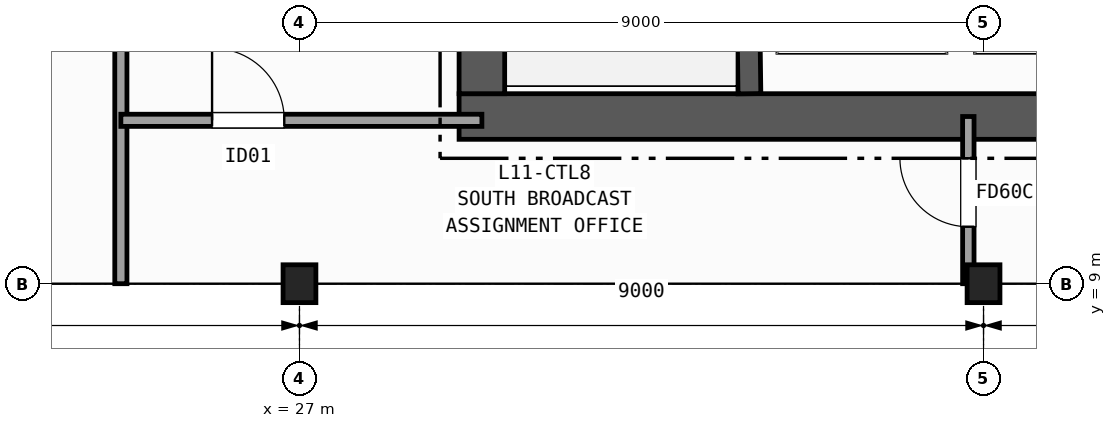
"""IFC4 building model, lengths in metres.
Left out: names, types, materials, properties, quantities, classifications, styles, units other than length and angle.
Written with IfcOpenShell. Run it as: python <this file> out.ifc"""

import sys

from ifc_helpers import new_model, si_unit, direction, frame, frame_2d, origin, origin_2d, place, context, subcontext, project, spatial, rectangle, i_section, extrude, element, fill, save


model = new_model("IFC4")
c1 = context("Model", 3, precision=1e-05, world=origin(), true_north=direction((0.0, 1.0)))
c2 = subcontext(c1, "Body", "Model", "MODEL_VIEW")
j1 = project(units=[si_unit("LENGTHUNIT", "METRE"), si_unit("PLANEANGLEUNIT", "RADIAN")], contexts=[c1])
p1 = place(None, origin())
s1 = spatial("IfcSite", under=j1, at=p1, CompositionType="ELEMENT")
p2 = place(p1, origin())
s2 = spatial("IfcBuilding", under=s1, at=p2, CompositionType="ELEMENT")
p3 = place(p2, frame((0.0, 0.0, 50.8)))
s3 = spatial("IfcBuildingStorey", under=s2, at=p3, CompositionType="ELEMENT", Elevation=50.8)
for number, where, z_axis, x_axis in (
    (1, (27.0, 9.0, 0.0), (0.0, 0.0, 1.0), (1.0, 0.0, 0.0)),
    (2, (36.0, 9.0, 0.0), (0.0, 0.0, 1.0), (1.0, 0.0, 0.0)),
):
    element("IfcColumn", number, at=place(p3, frame(where, z_axis=z_axis, x_axis=x_axis)), inside=s3, PredefinedType="COLUMN", context=c2, shape_type="SweptSolid", body=[
        extrude(i_section(OverallWidth=0.432, OverallDepth=0.498, WebThickness=0.056, FlangeThickness=0.089, FilletRadius=0.015, at=origin_2d()), origin(), (0.0, 0.0, 1.0), 3.7),
    ])
p4 = place(p3, frame((29.1, 11.2, 0.0), z_axis=(0.0, 0.0, 1.0), x_axis=(1.0, 0.0, 0.0)))
e3 = element("IfcWall", 3, at=p4, inside=s3, PredefinedType="SHEAR", context=c2, shape_type="SweptSolid", body=[
    extrude(rectangle(XDim=14.0, YDim=0.6, at=frame_2d((7.0, 0.0))), origin(), (0.0, 0.0, 1.0), 3.42),
])
p5 = place(p3, frame((29.4, 24.3, 0.0), z_axis=(0.0, 0.0, 1.0), x_axis=(0.0, -1.0, 0.0)))
e4 = element("IfcWall", 4, at=p5, inside=s3, PredefinedType="SHEAR", context=c2, shape_type="SweptSolid", body=[
    extrude(rectangle(XDim=12.8, YDim=0.6, at=frame_2d((6.4, 0.0))), origin(), (0.0, 0.0, 1.0), 3.42),
])
p6 = place(p5, frame((1.4, 0.0, 0.0)))
e5 = element("IfcOpeningElement", 5, at=p6, cuts=e4, PredefinedType="OPENING", context=c2, shape_type="SweptSolid", body=[
    extrude(rectangle(XDim=1.35, YDim=2.15, at=frame_2d((0.675, 1.075))), frame((0.0, 0.31, 0.0), z_axis=(0.0, -1.0, 0.0), x_axis=(1.0, 0.0, 0.0)), (0.0, 0.0, 1.0), 0.62),
])
p7 = place(p3, frame((32.92, 11.5, 0.0), z_axis=(0.0, 0.0, 1.0), x_axis=(-0.013244407292, 0.999912288991, 0.0)))
e6 = element("IfcWall", 6, at=p7, inside=s3, PredefinedType="SHEAR", context=c2, shape_type="SweptSolid", body=[
    extrude(rectangle(XDim=9.051, YDim=0.3, at=frame_2d((4.525, 0.0))), origin(), (0.0, 0.0, 1.0), 3.42),
])
p8 = place(p3, frame((24.65, 9.0, 0.0), z_axis=(0.0, 0.0, 1.0), x_axis=(0.0, 1.0, 0.0)))
e7 = element("IfcWall", 7, at=p8, inside=s3, PredefinedType="PARTITIONING", context=c2, shape_type="SweptSolid", body=[
    extrude(rectangle(XDim=19.2, YDim=0.16, at=frame_2d((9.6, 0.0))), origin(), (0.0, 0.0, 1.0), 2.627),
])
p9 = place(p8, frame((12.2, 0.0, 0.0)))
e8 = element("IfcOpeningElement", 8, at=p9, cuts=e7, PredefinedType="OPENING", context=c2, shape_type="SweptSolid", body=[
    extrude(rectangle(XDim=1.0, YDim=2.1, at=frame_2d((0.5, 1.05))), frame((0.0, 0.09, 0.0), z_axis=(0.0, -1.0, 0.0), x_axis=(1.0, 0.0, 0.0)), (0.0, 0.0, 1.0), 0.18),
])
p10 = place(p8, frame((4.2, 0.0, 0.0)))
e9 = element("IfcOpeningElement", 9, at=p10, cuts=e7, PredefinedType="OPENING", context=c2, shape_type="SweptSolid", body=[
    extrude(rectangle(XDim=1.05, YDim=2.15, at=frame_2d((0.525, 1.075))), frame((0.0, 0.09, 0.0), z_axis=(0.0, -1.0, 0.0), x_axis=(1.0, 0.0, 0.0)), (0.0, 0.0, 1.0), 0.18),
])
p11 = place(p3, frame((24.65, 11.15, 0.0), z_axis=(0.0, 0.0, 1.0), x_axis=(1.0, 0.0, 0.0)))
e10 = element("IfcWall", 10, at=p11, inside=s3, PredefinedType="PARTITIONING", context=c2, shape_type="SweptSolid", body=[
    extrude(rectangle(XDim=4.75, YDim=0.16, at=frame_2d((2.375, 0.0))), origin(), (0.0, 0.0, 1.0), 2.792),
])
p12 = place(p11, frame((1.2, 0.0, 0.0)))
e11 = element("IfcOpeningElement", 11, at=p12, cuts=e10, PredefinedType="OPENING", context=c2, shape_type="SweptSolid", body=[
    extrude(rectangle(XDim=0.95, YDim=2.1, at=frame_2d((0.475, 1.05))), frame((0.0, 0.09, 0.0), z_axis=(0.0, -1.0, 0.0), x_axis=(1.0, 0.0, 0.0)), (0.0, 0.0, 1.0), 0.18),
])
p13 = place(p3, frame((35.8, 9.0, 0.0), z_axis=(0.0, 0.0, 1.0), x_axis=(0.0, 1.0, 0.0)))
e12 = element("IfcWall", 12, at=p13, inside=s3, PredefinedType="PARTITIONING", context=c2, shape_type="SweptSolid", body=[
    extrude(rectangle(XDim=2.2, YDim=0.15, at=frame_2d((1.1, 0.0))), origin(), (0.0, 0.0, 1.0), 2.627),
])
p14 = place(p13, frame((0.75, 0.0, 0.0)))
e13 = element("IfcOpeningElement", 13, at=p14, cuts=e12, PredefinedType="OPENING", context=c2, shape_type="SweptSolid", body=[
    extrude(rectangle(XDim=0.9, YDim=2.1, at=frame_2d((0.45, 1.05))), frame((0.0, 0.085, 0.0), z_axis=(0.0, -1.0, 0.0), x_axis=(1.0, 0.0, 0.0)), (0.0, 0.0, 1.0), 0.17),
])
p15 = place(p12, origin())
e14 = element("IfcDoor", 14, at=p15, inside=s3, OperationType="SINGLE_SWING_LEFT", PredefinedType="DOOR", context=c2, shape_type="SweptSolid", body=[
    extrude(rectangle(XDim=0.95, YDim=2.1, at=frame_2d((0.475, 1.05))), frame((0.0, 0.025, 0.0), z_axis=(0.0, -1.0, 0.0), x_axis=(1.0, 0.0, 0.0)), (0.0, 0.0, 1.0), 0.05),
])
fill(e11, e14)
p16 = place(p14, origin())
e15 = element("IfcDoor", 15, at=p16, inside=s3, OperationType="SINGLE_SWING_RIGHT", PredefinedType="DOOR", context=c2, shape_type="SweptSolid", body=[
    extrude(rectangle(XDim=0.9, YDim=2.1, at=frame_2d((0.45, 1.05))), frame((0.0, 0.025, 0.0), z_axis=(0.0, -1.0, 0.0), x_axis=(1.0, 0.0, 0.0)), (0.0, 0.0, 1.0), 0.05),
])
fill(e13, e15)
save(model, sys.argv[1])
